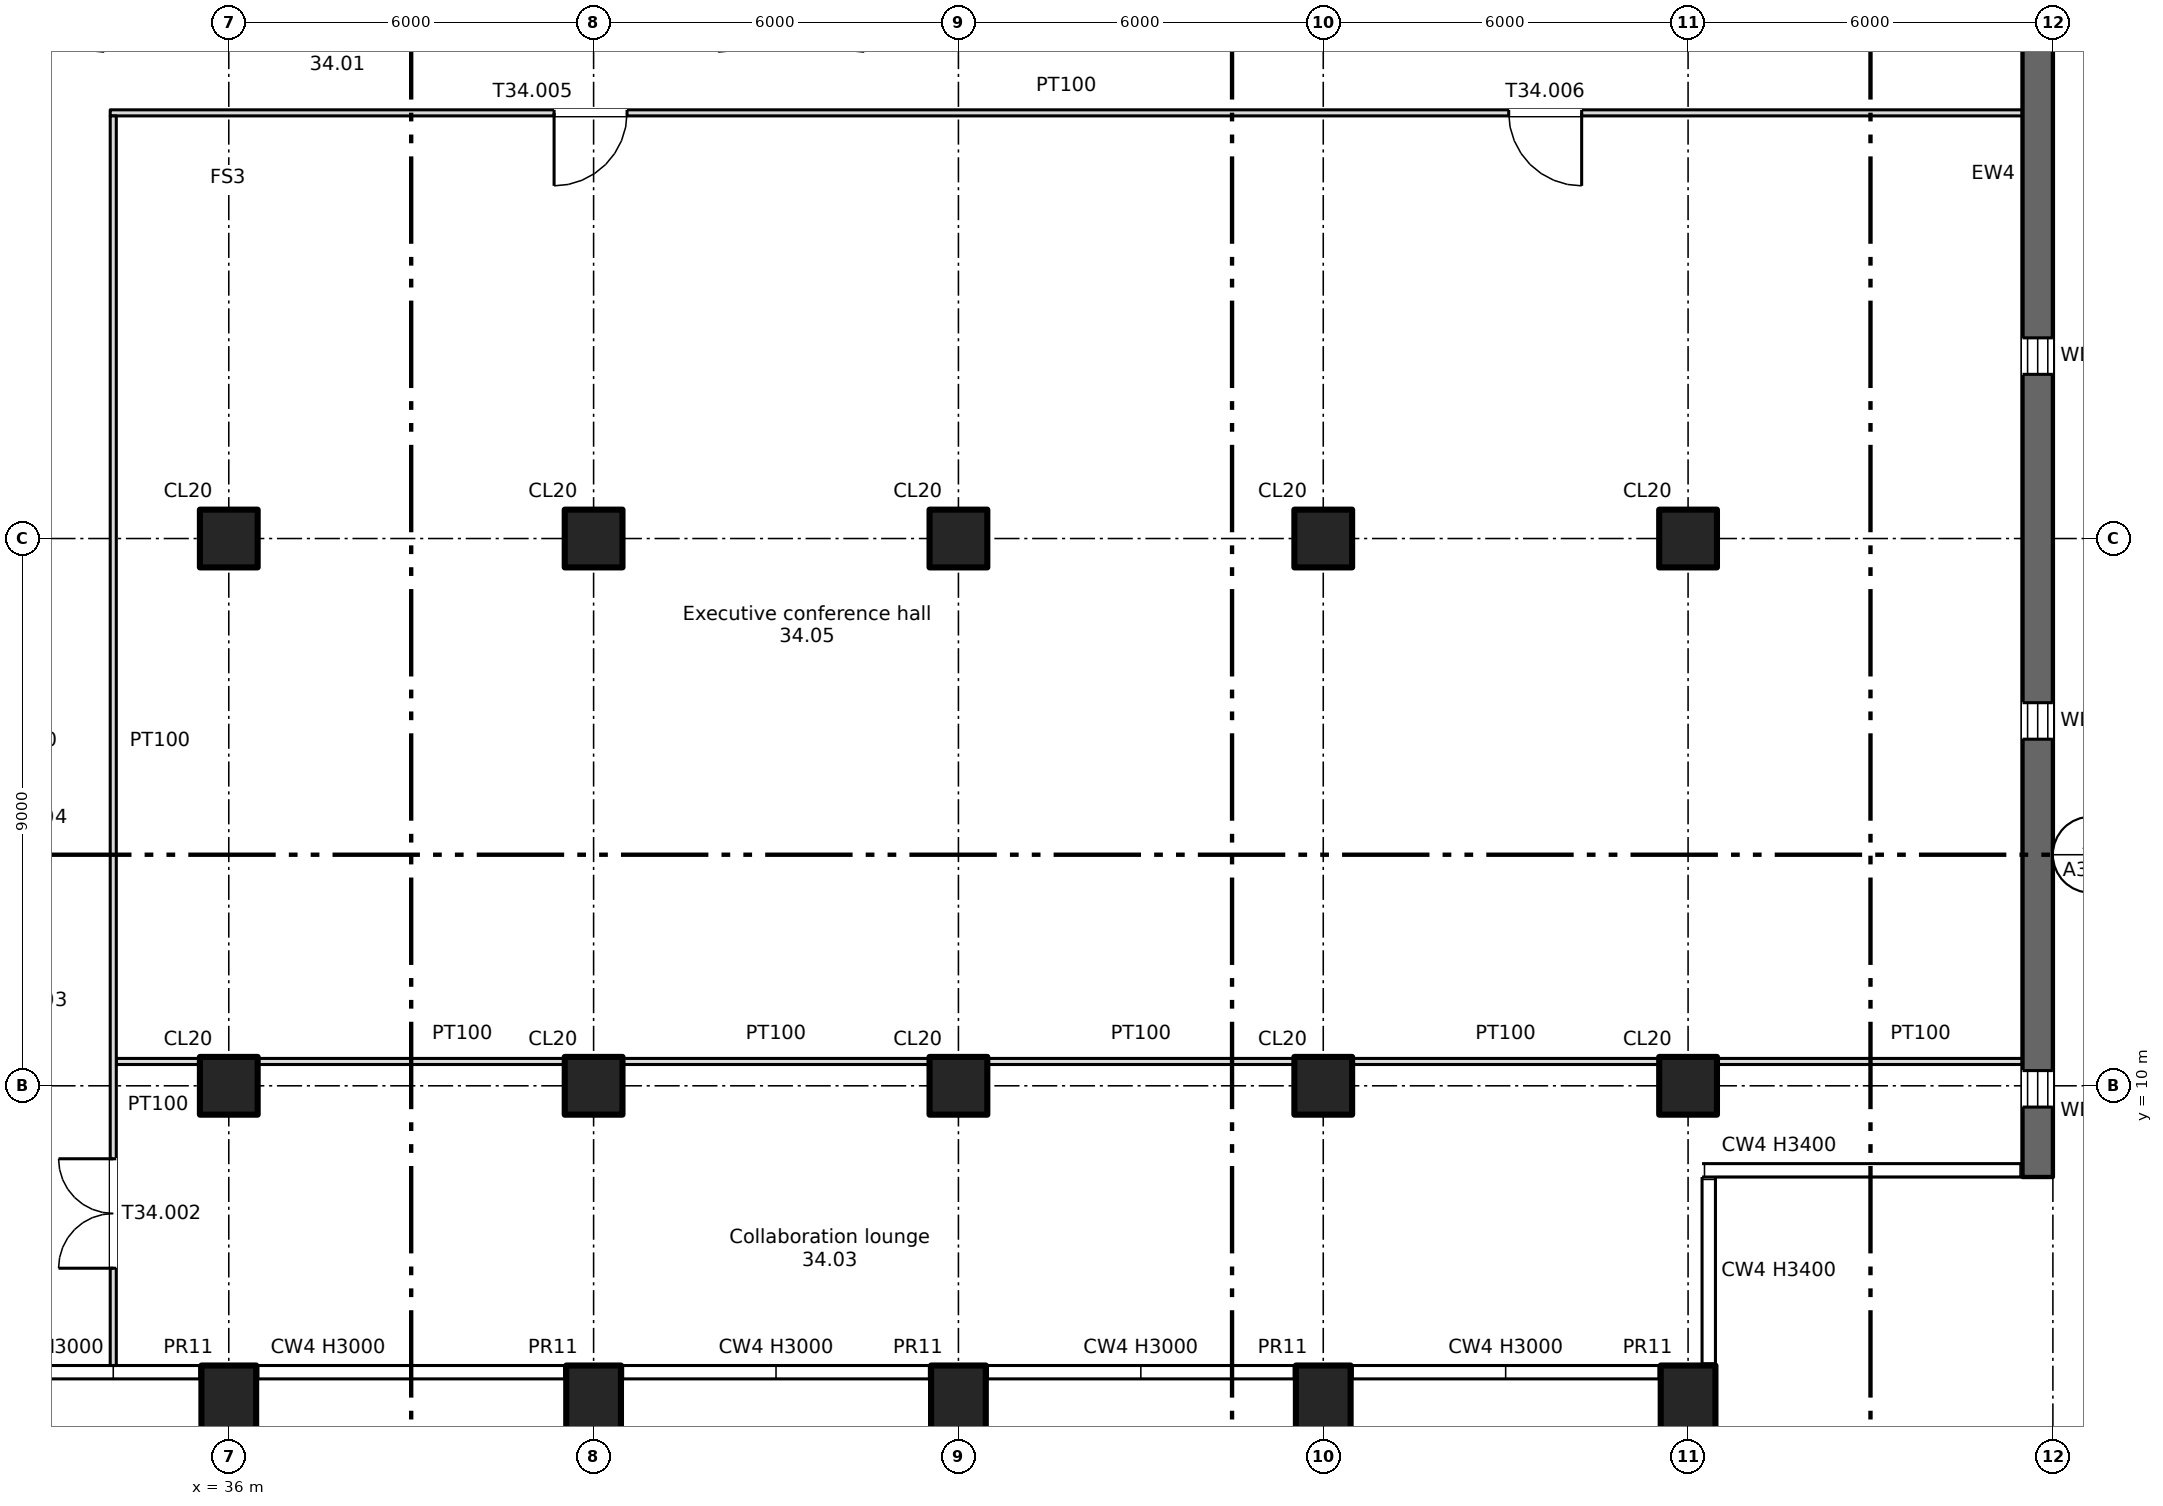
"""IFC4 building model, lengths in metres.
Left out: names, types, materials, properties, quantities, classifications, styles, units other than length and angle.
Written with IfcOpenShell. Run it as: python <this file> out.ifc"""

import sys

from ifc_helpers import new_model, si_unit, direction, frame, frame_2d, origin, origin_2d, place, context, subcontext, project, spatial, rectangle, extrude, element, fill, save


model = new_model("IFC4")
c1 = context("Model", 3, precision=1e-05, world=origin(), true_north=direction((0.0, 1.0)))
c2 = subcontext(c1, "Body", "Model", "MODEL_VIEW")
j1 = project(units=[si_unit("LENGTHUNIT", "METRE"), si_unit("PLANEANGLEUNIT", "RADIAN")], contexts=[c1])
p1 = place(None, origin())
s1 = spatial("IfcSite", under=j1, at=p1, CompositionType="ELEMENT")
p2 = place(p1, origin())
s2 = spatial("IfcBuilding", under=s1, at=p2, CompositionType="ELEMENT")
p3 = place(p2, frame((0.0, 0.0, 235.55)))
s3 = spatial("IfcBuildingStorey", under=s2, at=p3, CompositionType="ELEMENT", Elevation=235.55)
for number, where, z_axis, x_axis in (
    (1, (36.0, 4.7, -0.4), (0.0, 0.0, 1.0), (1.0, 0.0, 0.0)),
    (2, (42.0, 4.7, -0.4), (0.0, 0.0, 1.0), (1.0, 0.0, 0.0)),
    (3, (48.0, 4.7, -0.4), (0.0, 0.0, 1.0), (1.0, 0.0, 0.0)),
    (4, (54.0, 4.7, -0.4), (0.0, 0.0, 1.0), (1.0, 0.0, 0.0)),
    (5, (60.0, 4.7, -0.4), (0.0, 0.0, 1.0), (1.0, 0.0, 0.0)),
):
    element("IfcColumn", number, at=place(p3, frame(where, z_axis=z_axis, x_axis=x_axis)), inside=s3, PredefinedType="COLUMN", context=c2, shape_type="SweptSolid", body=[
        extrude(rectangle(XDim=0.9, YDim=1.4, at=origin_2d()), origin(), (0.0, 0.0, 1.0), 3.8),
    ])
for number, where, z_axis, x_axis in (
    (6, (36.0, 10.0, 0.0), (0.0, 0.0, 1.0), (1.0, 0.0, 0.0)),
    (7, (36.0, 19.0, 0.0), (0.0, 0.0, 1.0), (1.0, 0.0, 0.0)),
    (8, (42.0, 10.0, 0.0), (0.0, 0.0, 1.0), (1.0, 0.0, 0.0)),
    (9, (42.0, 19.0, 0.0), (0.0, 0.0, 1.0), (1.0, 0.0, 0.0)),
    (10, (48.0, 10.0, 0.0), (0.0, 0.0, 1.0), (1.0, 0.0, 0.0)),
    (11, (48.0, 19.0, 0.0), (0.0, 0.0, 1.0), (1.0, 0.0, 0.0)),
    (12, (54.0, 10.0, 0.0), (0.0, 0.0, 1.0), (1.0, 0.0, 0.0)),
    (13, (54.0, 19.0, 0.0), (0.0, 0.0, 1.0), (1.0, 0.0, 0.0)),
    (14, (60.0, 10.0, 0.0), (0.0, 0.0, 1.0), (1.0, 0.0, 0.0)),
    (15, (60.0, 19.0, 0.0), (0.0, 0.0, 1.0), (1.0, 0.0, 0.0)),
):
    element("IfcColumn", number, at=place(p3, frame(where, z_axis=z_axis, x_axis=x_axis)), inside=s3, PredefinedType="COLUMN", context=c2, shape_type="SweptSolid", body=[
        extrude(rectangle(XDim=0.95, YDim=0.95, at=origin_2d()), origin(), (0.0, 0.0, 1.0), 3.4),
    ])
p4 = place(p3, frame((65.75, 8.5, 0.0), z_axis=(0.0, 0.0, 1.0), x_axis=(0.0, 1.0, 0.0)))
e16 = element("IfcWall", 16, at=p4, inside=s3, PredefinedType="SHEAR", context=c2, shape_type="SweptSolid", body=[
    extrude(rectangle(XDim=33.0, YDim=0.5, at=frame_2d((16.5, 0.0))), origin(), (0.0, 0.0, 1.0), 3.4),
])
p5 = place(p4, frame((1.15, 0.0, 0.6)))
e17 = element("IfcOpeningElement", 17, at=p5, cuts=e16, PredefinedType="OPENING", context=c2, shape_type="SweptSolid", body=[
    extrude(rectangle(XDim=0.6, YDim=2.4, at=frame_2d((0.3, 1.2))), frame((0.0, 0.26, 0.0), z_axis=(0.0, -1.0, 0.0), x_axis=(1.0, 0.0, 0.0)), (0.0, 0.0, 1.0), 0.52),
])
p6 = place(p4, frame((7.2, 0.0, 0.6)))
e18 = element("IfcOpeningElement", 18, at=p6, cuts=e16, PredefinedType="OPENING", context=c2, shape_type="SweptSolid", body=[
    extrude(rectangle(XDim=0.6, YDim=2.4, at=frame_2d((0.3, 1.2))), frame((0.0, 0.26, 0.0), z_axis=(0.0, -1.0, 0.0), x_axis=(1.0, 0.0, 0.0)), (0.0, 0.0, 1.0), 0.52),
])
p7 = place(p4, frame((13.2, 0.0, 0.6)))
e19 = element("IfcOpeningElement", 19, at=p7, cuts=e16, PredefinedType="OPENING", context=c2, shape_type="SweptSolid", body=[
    extrude(rectangle(XDim=0.6, YDim=2.4, at=frame_2d((0.3, 1.2))), frame((0.0, 0.26, 0.0), z_axis=(0.0, -1.0, 0.0), x_axis=(1.0, 0.0, 0.0)), (0.0, 0.0, 1.0), 0.52),
])
p8 = place(p3, frame((60.475, 10.4, 0.0), z_axis=(0.0, 0.0, 1.0), x_axis=(1.0, 0.0, 0.0)))
e20 = element("IfcWall", 20, at=p8, inside=s3, PredefinedType="PARTITIONING", context=c2, shape_type="SweptSolid", body=[
    extrude(rectangle(XDim=5.025, YDim=0.1, at=frame_2d((2.512, 0.0))), origin(), (0.0, 0.0, 1.0), 3.4),
])
for number, where, z_axis, x_axis in (
    (21, (54.475, 10.4, 0.0), (0.0, 0.0, 1.0), (1.0, 0.0, 0.0)),
    (22, (48.475, 10.4, 0.0), (0.0, 0.0, 1.0), (1.0, 0.0, 0.0)),
    (23, (42.475, 10.4, 0.0), (0.0, 0.0, 1.0), (1.0, 0.0, 0.0)),
    (24, (36.475, 10.4, 0.0), (0.0, 0.0, 1.0), (1.0, 0.0, 0.0)),
):
    element("IfcWall", number, at=place(p3, frame(where, z_axis=z_axis, x_axis=x_axis)), inside=s3, PredefinedType="PARTITIONING", context=c2, shape_type="SweptSolid", body=[
        extrude(rectangle(XDim=5.05, YDim=0.1, at=frame_2d((2.525, 0.0))), origin(), (0.0, 0.0, 1.0), 3.4),
    ])
p9 = place(p3, frame((34.15, 10.4, 0.0), z_axis=(0.0, 0.0, 1.0), x_axis=(1.0, 0.0, 0.0)))
e25 = element("IfcWall", 25, at=p9, inside=s3, PredefinedType="PARTITIONING", context=c2, shape_type="SweptSolid", body=[
    extrude(rectangle(XDim=1.375, YDim=0.1, at=frame_2d((0.688, 0.0))), origin(), (0.0, 0.0, 1.0), 3.4),
])
p10 = place(p3, frame((34.05, 26.0, 0.0), z_axis=(0.0, 0.0, 1.0), x_axis=(1.0, 0.0, 0.0)))
e26 = element("IfcWall", 26, at=p10, inside=s3, PredefinedType="PARTITIONING", context=c2, shape_type="SweptSolid", body=[
    extrude(rectangle(XDim=31.45, YDim=0.1, at=frame_2d((15.725, 0.0))), origin(), (0.0, 0.0, 1.0), 3.4),
])
p11 = place(p10, frame((7.3, 0.0, 0.0)))
e27 = element("IfcOpeningElement", 27, at=p11, cuts=e26, PredefinedType="OPENING", context=c2, shape_type="SweptSolid", body=[
    extrude(rectangle(XDim=1.2, YDim=2.1, at=frame_2d((0.6, 1.05))), frame((0.0, 0.06, 0.0), z_axis=(0.0, -1.0, 0.0), x_axis=(1.0, 0.0, 0.0)), (0.0, 0.0, 1.0), 0.12),
])
p12 = place(p10, frame((23.0, 0.0, 0.0)))
e28 = element("IfcOpeningElement", 28, at=p12, cuts=e26, PredefinedType="OPENING", context=c2, shape_type="SweptSolid", body=[
    extrude(rectangle(XDim=1.2, YDim=2.1, at=frame_2d((0.6, 1.05))), frame((0.0, 0.06, 0.0), z_axis=(0.0, -1.0, 0.0), x_axis=(1.0, 0.0, 0.0)), (0.0, 0.0, 1.0), 0.12),
])
p13 = place(p3, frame((34.1, 5.4, 0.0), z_axis=(0.0, 0.0, 1.0), x_axis=(0.0, 1.0, 0.0)))
e29 = element("IfcWall", 29, at=p13, inside=s3, PredefinedType="PARTITIONING", context=c2, shape_type="SweptSolid", body=[
    extrude(rectangle(XDim=20.55, YDim=0.1, at=frame_2d((10.275, 0.0))), origin(), (0.0, 0.0, 1.0), 3.4),
])
p14 = place(p13, frame((1.6, 0.0, 0.0)))
e30 = element("IfcOpeningElement", 30, at=p14, cuts=e29, PredefinedType="OPENING", context=c2, shape_type="SweptSolid", body=[
    extrude(rectangle(XDim=1.8, YDim=2.1, at=frame_2d((0.9, 1.05))), frame((0.0, 0.06, 0.0), z_axis=(0.0, -1.0, 0.0), x_axis=(1.0, 0.0, 0.0)), (0.0, 0.0, 1.0), 0.12),
])
p15 = place(p5, origin())
e31 = element("IfcWindow", 31, at=p15, inside=s3, PartitioningType="SINGLE_PANEL", PredefinedType="WINDOW", context=c2, shape_type="SweptSolid", body=[
    extrude(rectangle(XDim=0.6, YDim=2.4, at=frame_2d((0.3, 1.2))), frame((0.0, 0.03, 0.0), z_axis=(0.0, -1.0, 0.0), x_axis=(1.0, 0.0, 0.0)), (0.0, 0.0, 1.0), 0.06),
])
fill(e17, e31)
p16 = place(p6, origin())
e32 = element("IfcWindow", 32, at=p16, inside=s3, PartitioningType="SINGLE_PANEL", PredefinedType="WINDOW", context=c2, shape_type="SweptSolid", body=[
    extrude(rectangle(XDim=0.6, YDim=2.4, at=frame_2d((0.3, 1.2))), frame((0.0, 0.03, 0.0), z_axis=(0.0, -1.0, 0.0), x_axis=(1.0, 0.0, 0.0)), (0.0, 0.0, 1.0), 0.06),
])
fill(e18, e32)
p17 = place(p7, origin())
e33 = element("IfcWindow", 33, at=p17, inside=s3, PartitioningType="SINGLE_PANEL", PredefinedType="WINDOW", context=c2, shape_type="SweptSolid", body=[
    extrude(rectangle(XDim=0.6, YDim=2.4, at=frame_2d((0.3, 1.2))), frame((0.0, 0.03, 0.0), z_axis=(0.0, -1.0, 0.0), x_axis=(1.0, 0.0, 0.0)), (0.0, 0.0, 1.0), 0.06),
])
fill(e19, e33)
p18 = place(p14, origin())
e34 = element("IfcDoor", 34, at=p18, inside=s3, OperationType="DOUBLE_DOOR_SINGLE_SWING", PredefinedType="DOOR", context=c2, shape_type="SweptSolid", body=[
    extrude(rectangle(XDim=1.8, YDim=2.1, at=frame_2d((0.9, 1.05))), frame((0.0, 0.025, 0.0), z_axis=(0.0, -1.0, 0.0), x_axis=(1.0, 0.0, 0.0)), (0.0, 0.0, 1.0), 0.05),
])
fill(e30, e34)
p19 = place(p11, origin())
e35 = element("IfcDoor", 35, at=p19, inside=s3, OperationType="SINGLE_SWING_LEFT", PredefinedType="DOOR", context=c2, shape_type="SweptSolid", body=[
    extrude(rectangle(XDim=1.2, YDim=2.1, at=frame_2d((0.6, 1.05))), frame((0.0, 0.025, 0.0), z_axis=(0.0, -1.0, 0.0), x_axis=(1.0, 0.0, 0.0)), (0.0, 0.0, 1.0), 0.05),
])
fill(e27, e35)
p20 = place(p12, origin())
e36 = element("IfcDoor", 36, at=p20, inside=s3, OperationType="SINGLE_SWING_RIGHT", PredefinedType="DOOR", context=c2, shape_type="SweptSolid", body=[
    extrude(rectangle(XDim=1.2, YDim=2.1, at=frame_2d((0.6, 1.05))), frame((0.0, 0.025, 0.0), z_axis=(0.0, -1.0, 0.0), x_axis=(1.0, 0.0, 0.0)), (0.0, 0.0, 1.0), 0.05),
])
fill(e28, e36)
save(model, sys.argv[1])
